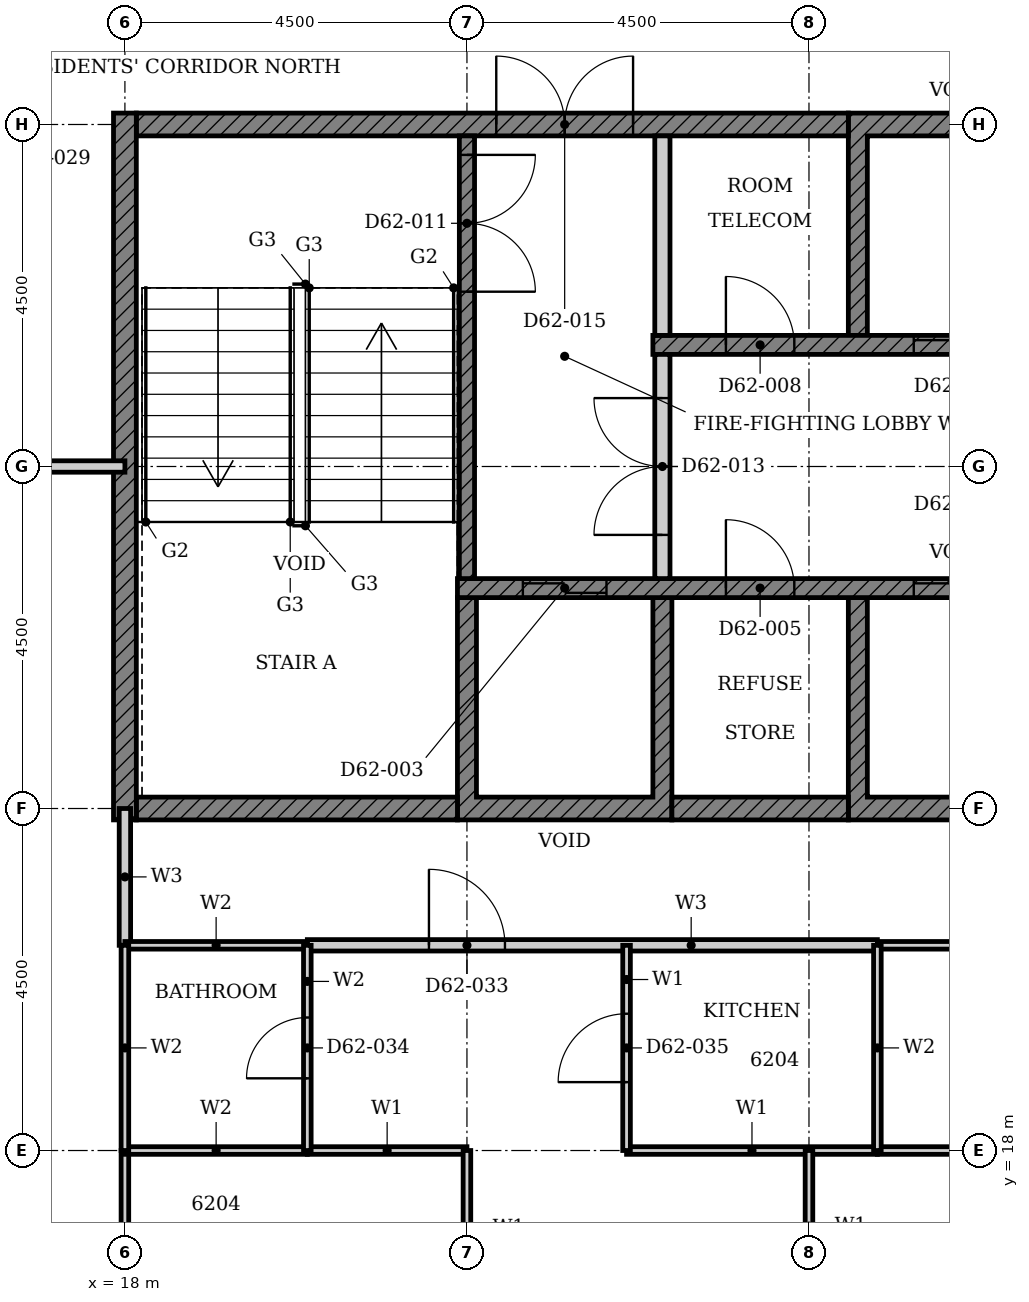
"""IFC4 building model, lengths in metres.
Left out: names, types, materials, properties, quantities, classifications, styles, units other than length and angle.
Written with IfcOpenShell. Run it as: python <this file> out.ifc"""

import sys

from ifc_helpers import new_model, si_unit, direction, frame, frame_2d, origin, place, context, subcontext, project, spatial, polyline, rectangle, outline, extrude, element, fill, save


model = new_model("IFC4")
c1 = context("Model", 3, precision=1e-05, world=origin(), true_north=direction((0.0, 1.0)))
c2 = subcontext(c1, "Body", "Model", "MODEL_VIEW")
j1 = project(units=[si_unit("LENGTHUNIT", "METRE"), si_unit("PLANEANGLEUNIT", "RADIAN")], contexts=[c1])
p1 = place(None, origin())
s1 = spatial("IfcSite", under=j1, at=p1, CompositionType="ELEMENT")
p2 = place(p1, origin())
s2 = spatial("IfcBuilding", under=s1, at=p2, CompositionType="ELEMENT")
p3 = place(p2, frame((0.0, 0.0, 245.3)))
s3 = spatial("IfcBuildingStorey", under=s2, at=p3, CompositionType="ELEMENT", Elevation=245.3)
p4 = place(p3, origin())
e1 = element("IfcWall", 1, at=p4, inside=s3, PredefinedType="SHEAR", context=c2, shape_type="SweptSolid", body=[
    extrude(outline(polyline([(22.375, 22.35), (25.197, 22.35), (25.197, 25.275), (24.947, 25.275), (24.947, 22.65), (22.625, 22.65), (22.625, 25.275), (22.375, 25.275), (22.375, 22.35)])), origin(), (0.0, 0.0, 1.0), 3.4),
])
p5 = place(p3, origin())
e2 = element("IfcWall", 2, at=p5, inside=s3, PredefinedType="SHEAR", context=c2, shape_type="SweptSolid", body=[
    extrude(outline(polyline([(27.518, 22.35), (30.339, 22.35), (30.339, 25.275), (30.089, 25.275), (30.089, 22.65), (27.768, 22.65), (27.768, 25.275), (27.518, 25.275), (27.518, 22.35)])), origin(), (0.0, 0.0, 1.0), 3.4),
])
p6 = place(p3, origin())
e3 = element("IfcWall", 3, at=p6, inside=s3, PredefinedType="SHEAR", context=c2, shape_type="SweptSolid", body=[
    extrude(outline(polyline([(27.518, 28.725), (27.768, 28.725), (27.768, 31.35), (30.089, 31.35), (30.089, 28.725), (30.339, 28.725), (30.339, 31.65), (27.518, 31.65), (27.518, 28.725)])), origin(), (0.0, 0.0, 1.0), 3.4),
])
p7 = place(p3, frame((18.15, 22.5, 0.0), z_axis=(0.0, 0.0, 1.0), x_axis=(1.0, 0.0, 0.0)))
e4 = element("IfcWall", 4, at=p7, inside=s3, PredefinedType="SHEAR", context=c2, shape_type="SweptSolid", body=[
    extrude(rectangle(XDim=4.225, YDim=0.3, at=frame_2d((2.113, 0.0))), origin(), (0.0, 0.0, 1.0), 3.4),
])
p8 = place(p3, frame((25.197, 22.5, 0.0), z_axis=(0.0, 0.0, 1.0), x_axis=(1.0, 0.0, 0.0)))
e5 = element("IfcWall", 5, at=p8, inside=s3, PredefinedType="SHEAR", context=c2, shape_type="SweptSolid", body=[
    extrude(rectangle(XDim=2.321, YDim=0.3, at=frame_2d((1.161, 0.0))), origin(), (0.0, 0.0, 1.0), 3.4),
])
p9 = place(p3, frame((18.15, 31.5, 0.0), z_axis=(0.0, 0.0, 1.0), x_axis=(1.0, 0.0, 0.0)))
e6 = element("IfcWall", 6, at=p9, inside=s3, PredefinedType="SHEAR", context=c2, shape_type="SweptSolid", body=[
    extrude(rectangle(XDim=9.368, YDim=0.3, at=frame_2d((4.684, 0.0))), origin(), (0.0, 0.0, 1.0), 3.4),
])
p10 = place(p9, frame((4.736, 0.0, 0.0)))
e7 = element("IfcOpeningElement", 7, at=p10, cuts=e6, PredefinedType="OPENING", context=c2, shape_type="SweptSolid", body=[
    extrude(rectangle(XDim=1.8, YDim=2.1, at=frame_2d((0.9, 1.05))), frame((0.0, 0.16, 0.0), z_axis=(0.0, -1.0, 0.0), x_axis=(1.0, 0.0, 0.0)), (0.0, 0.0, 1.0), 0.32),
])
p11 = place(p3, frame((18.0, 22.35, 0.0), z_axis=(0.0, 0.0, 1.0), x_axis=(0.0, 1.0, 0.0)))
e8 = element("IfcWall", 8, at=p11, inside=s3, PredefinedType="SHEAR", context=c2, shape_type="SweptSolid", body=[
    extrude(rectangle(XDim=9.3, YDim=0.3, at=frame_2d((4.65, 0.0))), origin(), (0.0, 0.0, 1.0), 3.4),
])
p12 = place(p3, frame((22.375, 25.4, 0.0), z_axis=(0.0, 0.0, 1.0), x_axis=(1.0, 0.0, 0.0)))
e9 = element("IfcWall", 9, at=p12, inside=s3, PredefinedType="SHEAR", context=c2, shape_type="SweptSolid", body=[
    extrude(rectangle(XDim=15.678, YDim=0.25, at=frame_2d((7.839, 0.0))), origin(), (0.0, 0.0, 1.0), 3.4),
])
p13 = place(p12, frame((6.004, 0.0, 0.0)))
e10 = element("IfcOpeningElement", 10, at=p13, cuts=e9, PredefinedType="OPENING", context=c2, shape_type="SweptSolid", body=[
    extrude(rectangle(XDim=1.1, YDim=2.1, at=frame_2d((0.55, 1.05))), frame((0.0, 0.135, 0.0), z_axis=(0.0, -1.0, 0.0), x_axis=(1.0, 0.0, 0.0)), (0.0, 0.0, 1.0), 0.27),
])
p14 = place(p12, frame((0.861, 0.0, 0.0)))
e11 = element("IfcOpeningElement", 11, at=p14, cuts=e9, PredefinedType="OPENING", context=c2, shape_type="SweptSolid", body=[
    extrude(rectangle(XDim=1.1, YDim=2.1, at=frame_2d((0.55, 1.05))), frame((0.0, 0.135, 0.0), z_axis=(0.0, -1.0, 0.0), x_axis=(1.0, 0.0, 0.0)), (0.0, 0.0, 1.0), 0.27),
])
p15 = place(p12, frame((3.532, 0.0, 0.0)))
e12 = element("IfcOpeningElement", 12, at=p15, cuts=e9, PredefinedType="OPENING", context=c2, shape_type="SweptSolid", body=[
    extrude(rectangle(XDim=0.9, YDim=2.1, at=frame_2d((0.45, 1.05))), frame((0.0, 0.135, 0.0), z_axis=(0.0, -1.0, 0.0), x_axis=(1.0, 0.0, 0.0)), (0.0, 0.0, 1.0), 0.27),
])
p16 = place(p12, frame((8.675, 0.0, 0.0)))
e13 = element("IfcOpeningElement", 13, at=p16, cuts=e9, PredefinedType="OPENING", context=c2, shape_type="SweptSolid", body=[
    extrude(rectangle(XDim=0.9, YDim=2.1, at=frame_2d((0.45, 1.05))), frame((0.0, 0.135, 0.0), z_axis=(0.0, -1.0, 0.0), x_axis=(1.0, 0.0, 0.0)), (0.0, 0.0, 1.0), 0.27),
])
p17 = place(p12, frame((12.532, 0.0, 0.0)))
e14 = element("IfcOpeningElement", 14, at=p17, cuts=e9, PredefinedType="OPENING", context=c2, shape_type="SweptSolid", body=[
    extrude(rectangle(XDim=0.9, YDim=2.1, at=frame_2d((0.45, 1.05))), frame((0.0, 0.135, 0.0), z_axis=(0.0, -1.0, 0.0), x_axis=(1.0, 0.0, 0.0)), (0.0, 0.0, 1.0), 0.27),
])
p18 = place(p3, frame((24.947, 28.6, 0.0), z_axis=(0.0, 0.0, 1.0), x_axis=(1.0, 0.0, 0.0)))
e15 = element("IfcWall", 15, at=p18, inside=s3, PredefinedType="SHEAR", context=c2, shape_type="SweptSolid", body=[
    extrude(rectangle(XDim=15.678, YDim=0.25, at=frame_2d((7.839, 0.0))), origin(), (0.0, 0.0, 1.0), 3.4),
])
p19 = place(p18, frame((3.432, 0.0, 0.0)))
e16 = element("IfcOpeningElement", 16, at=p19, cuts=e15, PredefinedType="OPENING", context=c2, shape_type="SweptSolid", body=[
    extrude(rectangle(XDim=1.1, YDim=2.1, at=frame_2d((0.55, 1.05))), frame((0.0, 0.135, 0.0), z_axis=(0.0, -1.0, 0.0), x_axis=(1.0, 0.0, 0.0)), (0.0, 0.0, 1.0), 0.27),
])
p20 = place(p18, frame((13.718, 0.0, 0.0)))
e17 = element("IfcOpeningElement", 17, at=p20, cuts=e15, PredefinedType="OPENING", context=c2, shape_type="SweptSolid", body=[
    extrude(rectangle(XDim=1.1, YDim=2.1, at=frame_2d((0.55, 1.05))), frame((0.0, 0.135, 0.0), z_axis=(0.0, -1.0, 0.0), x_axis=(1.0, 0.0, 0.0)), (0.0, 0.0, 1.0), 0.27),
])
p21 = place(p18, frame((0.961, 0.0, 0.0)))
e18 = element("IfcOpeningElement", 18, at=p21, cuts=e15, PredefinedType="OPENING", context=c2, shape_type="SweptSolid", body=[
    extrude(rectangle(XDim=0.9, YDim=2.1, at=frame_2d((0.45, 1.05))), frame((0.0, 0.135, 0.0), z_axis=(0.0, -1.0, 0.0), x_axis=(1.0, 0.0, 0.0)), (0.0, 0.0, 1.0), 0.27),
])
p22 = place(p18, frame((7.389, 0.0, 0.0)))
e19 = element("IfcOpeningElement", 19, at=p22, cuts=e15, PredefinedType="OPENING", context=c2, shape_type="SweptSolid", body=[
    extrude(rectangle(XDim=0.9, YDim=2.1, at=frame_2d((0.45, 1.05))), frame((0.0, 0.135, 0.0), z_axis=(0.0, -1.0, 0.0), x_axis=(1.0, 0.0, 0.0)), (0.0, 0.0, 1.0), 0.27),
])
p23 = place(p18, frame((11.246, 0.0, 0.0)))
e20 = element("IfcOpeningElement", 20, at=p23, cuts=e15, PredefinedType="OPENING", context=c2, shape_type="SweptSolid", body=[
    extrude(rectangle(XDim=0.9, YDim=2.1, at=frame_2d((0.45, 1.05))), frame((0.0, 0.135, 0.0), z_axis=(0.0, -1.0, 0.0), x_axis=(1.0, 0.0, 0.0)), (0.0, 0.0, 1.0), 0.27),
])
p24 = place(p3, frame((25.072, 28.725, 0.0), z_axis=(0.0, 0.0, 1.0), x_axis=(0.0, 1.0, 0.0)))
e21 = element("IfcWall", 21, at=p24, inside=s3, PredefinedType="PARTITIONING", context=c2, shape_type="SweptSolid", body=[
    extrude(rectangle(XDim=2.625, YDim=0.2, at=frame_2d((1.312, 0.0))), origin(), (0.0, 0.0, 1.0), 3.4),
])
p25 = place(p3, frame((22.5, 31.35, 0.0), z_axis=(0.0, 0.0, 1.0), x_axis=(0.0, -1.0, 0.0)))
e22 = element("IfcWall", 22, at=p25, inside=s3, PredefinedType="SHEAR", context=c2, shape_type="SweptSolid", body=[
    extrude(rectangle(XDim=5.825, YDim=0.2, at=frame_2d((2.913, 0.0))), origin(), (0.0, 0.0, 1.0), 3.4),
])
p26 = place(p25, frame((0.25, 0.0, 0.0)))
e23 = element("IfcOpeningElement", 23, at=p26, cuts=e22, PredefinedType="OPENING", context=c2, shape_type="SweptSolid", body=[
    extrude(rectangle(XDim=1.8, YDim=2.1, at=frame_2d((0.9, 1.05))), frame((0.0, 0.11, 0.0), z_axis=(0.0, -1.0, 0.0), x_axis=(1.0, 0.0, 0.0)), (0.0, 0.0, 1.0), 0.22),
])
p27 = place(p3, frame((25.072, 25.525, 0.0), z_axis=(0.0, 0.0, 1.0), x_axis=(0.0, 1.0, 0.0)))
e24 = element("IfcWall", 24, at=p27, inside=s3, PredefinedType="PARTITIONING", context=c2, shape_type="SweptSolid", body=[
    extrude(rectangle(XDim=2.95, YDim=0.2, at=frame_2d((1.475, 0.0))), origin(), (0.0, 0.0, 1.0), 3.4),
])
p28 = place(p27, frame((0.575, 0.0, 0.0)))
e25 = element("IfcOpeningElement", 25, at=p28, cuts=e24, PredefinedType="OPENING", context=c2, shape_type="SweptSolid", body=[
    extrude(rectangle(XDim=1.8, YDim=2.1, at=frame_2d((0.9, 1.05))), frame((0.0, 0.11, 0.0), z_axis=(0.0, -1.0, 0.0), x_axis=(1.0, 0.0, 0.0)), (0.0, 0.0, 1.0), 0.22),
])
p29 = place(p3, frame((20.4, 20.7, 0.0), z_axis=(0.0, 0.0, 1.0), x_axis=(1.0, 0.0, 0.0)))
e26 = element("IfcWall", 26, at=p29, inside=s3, PredefinedType="PARTITIONING", context=c2, shape_type="SweptSolid", body=[
    extrude(rectangle(XDim=7.5, YDim=0.15, at=frame_2d((3.75, 0.0))), origin(), (0.0, 0.0, 1.0), 3.4),
])
p30 = place(p29, frame((1.6, 0.0, 0.0)))
e27 = element("IfcOpeningElement", 27, at=p30, cuts=e26, PredefinedType="OPENING", context=c2, shape_type="SweptSolid", body=[
    extrude(rectangle(XDim=1.0, YDim=2.2, at=frame_2d((0.5, 1.1))), frame((0.0, 0.085, 0.0), z_axis=(0.0, -1.0, 0.0), x_axis=(1.0, 0.0, 0.0)), (0.0, 0.0, 1.0), 0.17),
])
p31 = place(p3, frame((4.5, 27.0, 0.0), z_axis=(0.0, 0.0, 1.0), x_axis=(1.0, 0.0, 0.0)))
e28 = element("IfcWall", 28, at=p31, inside=s3, PredefinedType="PARTITIONING", context=c2, shape_type="SweptSolid", body=[
    extrude(rectangle(XDim=13.5, YDim=0.15, at=frame_2d((6.75, 0.0))), origin(), (0.0, 0.0, 1.0), 2.68),
])
p32 = place(p31, frame((5.35, 0.0, 0.0)))
e29 = element("IfcOpeningElement", 29, at=p32, cuts=e28, PredefinedType="OPENING", context=c2, shape_type="SweptSolid", body=[
    extrude(rectangle(XDim=1.0, YDim=2.1, at=frame_2d((0.5, 1.05))), frame((0.0, 0.085, 0.0), z_axis=(0.0, -1.0, 0.0), x_axis=(1.0, 0.0, 0.0)), (0.0, 0.0, 1.0), 0.17),
])
p33 = place(p3, frame((18.0, 20.7, 0.0), z_axis=(0.0, 0.0, 1.0), x_axis=(0.0, 1.0, 0.0)))
e30 = element("IfcWall", 30, at=p33, inside=s3, PredefinedType="PARTITIONING", context=c2, shape_type="SweptSolid", body=[
    extrude(rectangle(XDim=1.8, YDim=0.15, at=frame_2d((0.9, 0.0))), origin(), (0.0, 0.0, 1.0), 3.4),
])
p34 = place(p3, frame((20.4, 18.0, 0.0), z_axis=(0.0, 0.0, 1.0), x_axis=(1.0, 0.0, 0.0)))
e31 = element("IfcWall", 31, at=p34, inside=s3, PredefinedType="PARTITIONING", context=c2, shape_type="SweptSolid", body=[
    extrude(rectangle(XDim=2.1, YDim=0.1, at=frame_2d((1.05, 0.0))), origin(), (0.0, 0.0, 1.0), 3.4),
])
p35 = place(p3, frame((24.6, 18.0, 0.0), z_axis=(0.0, 0.0, 1.0), x_axis=(1.0, 0.0, 0.0)))
e32 = element("IfcWall", 32, at=p35, inside=s3, PredefinedType="PARTITIONING", context=c2, shape_type="SweptSolid", body=[
    extrude(rectangle(XDim=3.3, YDim=0.1, at=frame_2d((1.65, 0.0))), origin(), (0.0, 0.0, 1.0), 3.4),
])
p36 = place(p3, frame((18.0, 15.56, 0.0), z_axis=(0.0, 0.0, 1.0), x_axis=(0.0, 1.0, 0.0)))
e33 = element("IfcWall", 33, at=p36, inside=s3, PredefinedType="PARTITIONING", context=c2, shape_type="SweptSolid", body=[
    extrude(rectangle(XDim=2.439, YDim=0.1, at=frame_2d((1.219, 0.0))), origin(), (0.0, 0.0, 1.0), 3.4),
])
p37 = place(p3, frame((22.5, 13.26, 0.0), z_axis=(0.0, 0.0, 1.0), x_axis=(0.0, 1.0, 0.0)))
e34 = element("IfcWall", 34, at=p37, inside=s3, PredefinedType="PARTITIONING", context=c2, shape_type="SweptSolid", body=[
    extrude(rectangle(XDim=4.74, YDim=0.1, at=frame_2d((2.37, 0.0))), origin(), (0.0, 0.0, 1.0), 3.4),
])
p38 = place(p37, frame((1.8, 0.0, 0.0)))
e35 = element("IfcOpeningElement", 35, at=p38, cuts=e34, PredefinedType="OPENING", context=c2, shape_type="SweptSolid", body=[
    extrude(rectangle(XDim=0.9, YDim=2.1, at=frame_2d((0.45, 1.05))), frame((0.0, 0.06, 0.0), z_axis=(0.0, -1.0, 0.0), x_axis=(1.0, 0.0, 0.0)), (0.0, 0.0, 1.0), 0.12),
])
p39 = place(p3, frame((24.6, 18.0, 0.0), z_axis=(0.0, 0.0, 1.0), x_axis=(0.0, 1.0, 0.0)))
e36 = element("IfcWall", 36, at=p39, inside=s3, PredefinedType="PARTITIONING", context=c2, shape_type="SweptSolid", body=[
    extrude(rectangle(XDim=2.7, YDim=0.1, at=frame_2d((1.35, 0.0))), origin(), (0.0, 0.0, 1.0), 3.4),
])
p40 = place(p39, frame((0.9, 0.0, 0.0)))
e37 = element("IfcOpeningElement", 37, at=p40, cuts=e36, PredefinedType="OPENING", context=c2, shape_type="SweptSolid", body=[
    extrude(rectangle(XDim=0.9, YDim=2.1, at=frame_2d((0.45, 1.05))), frame((0.0, 0.06, 0.0), z_axis=(0.0, -1.0, 0.0), x_axis=(1.0, 0.0, 0.0)), (0.0, 0.0, 1.0), 0.12),
])
p41 = place(p3, frame((27.0, 13.31, 0.0), z_axis=(0.0, 0.0, 1.0), x_axis=(0.0, 1.0, 0.0)))
e38 = element("IfcWall", 38, at=p41, inside=s3, PredefinedType="PARTITIONING", context=c2, shape_type="SweptSolid", body=[
    extrude(rectangle(XDim=4.69, YDim=0.1, at=frame_2d((2.345, 0.0))), origin(), (0.0, 0.0, 1.0), 3.4),
])
p42 = place(p41, frame((1.8, 0.0, 0.0)))
e39 = element("IfcOpeningElement", 39, at=p42, cuts=e38, PredefinedType="OPENING", context=c2, shape_type="SweptSolid", body=[
    extrude(rectangle(XDim=0.9, YDim=2.1, at=frame_2d((0.45, 1.05))), frame((0.0, 0.06, 0.0), z_axis=(0.0, -1.0, 0.0), x_axis=(1.0, 0.0, 0.0)), (0.0, 0.0, 1.0), 0.12),
])
p43 = place(p3, frame((18.0, 18.0, 0.0), z_axis=(0.0, 0.0, 1.0), x_axis=(1.0, 0.0, 0.0)))
e40 = element("IfcWall", 40, at=p43, inside=s3, PredefinedType="PARTITIONING", context=c2, shape_type="SweptSolid", body=[
    extrude(rectangle(XDim=2.4, YDim=0.1, at=frame_2d((1.2, 0.0))), origin(), (0.0, 0.0, 1.0), 3.4),
])
p44 = place(p3, frame((27.9, 18.0, 0.0), z_axis=(0.0, 0.0, 1.0), x_axis=(1.0, 0.0, 0.0)))
e41 = element("IfcWall", 41, at=p44, inside=s3, PredefinedType="PARTITIONING", context=c2, shape_type="SweptSolid", body=[
    extrude(rectangle(XDim=3.6, YDim=0.1, at=frame_2d((1.8, 0.0))), origin(), (0.0, 0.0, 1.0), 3.4),
])
p45 = place(p44, frame((1.4, 0.0, 0.0)))
e42 = element("IfcOpeningElement", 42, at=p45, cuts=e41, PredefinedType="OPENING", context=c2, shape_type="SweptSolid", body=[
    extrude(rectangle(XDim=0.8, YDim=2.1, at=frame_2d((0.4, 1.05))), frame((0.0, 0.06, 0.0), z_axis=(0.0, -1.0, 0.0), x_axis=(1.0, 0.0, 0.0)), (0.0, 0.0, 1.0), 0.12),
])
p46 = place(p3, frame((18.0, 20.7, 0.0), z_axis=(0.0, 0.0, 1.0), x_axis=(1.0, 0.0, 0.0)))
e43 = element("IfcWall", 43, at=p46, inside=s3, PredefinedType="PARTITIONING", context=c2, shape_type="SweptSolid", body=[
    extrude(rectangle(XDim=2.4, YDim=0.1, at=frame_2d((1.2, 0.0))), origin(), (0.0, 0.0, 1.0), 3.4),
])
p47 = place(p3, frame((27.9, 20.7, 0.0), z_axis=(0.0, 0.0, 1.0), x_axis=(1.0, 0.0, 0.0)))
e44 = element("IfcWall", 44, at=p47, inside=s3, PredefinedType="PARTITIONING", context=c2, shape_type="SweptSolid", body=[
    extrude(rectangle(XDim=3.6, YDim=0.1, at=frame_2d((1.8, 0.0))), origin(), (0.0, 0.0, 1.0), 3.4),
])
p48 = place(p3, frame((18.0, 18.0, 0.0), z_axis=(0.0, 0.0, 1.0), x_axis=(0.0, 1.0, 0.0)))
e45 = element("IfcWall", 45, at=p48, inside=s3, PredefinedType="PARTITIONING", context=c2, shape_type="SweptSolid", body=[
    extrude(rectangle(XDim=2.7, YDim=0.1, at=frame_2d((1.35, 0.0))), origin(), (0.0, 0.0, 1.0), 3.4),
])
p49 = place(p3, frame((20.4, 18.0, 0.0), z_axis=(0.0, 0.0, 1.0), x_axis=(0.0, 1.0, 0.0)))
e46 = element("IfcWall", 46, at=p49, inside=s3, PredefinedType="PARTITIONING", context=c2, shape_type="SweptSolid", body=[
    extrude(rectangle(XDim=2.7, YDim=0.1, at=frame_2d((1.35, 0.0))), origin(), (0.0, 0.0, 1.0), 3.4),
])
p50 = place(p49, frame((0.95, 0.0, 0.0)))
e47 = element("IfcOpeningElement", 47, at=p50, cuts=e46, PredefinedType="OPENING", context=c2, shape_type="SweptSolid", body=[
    extrude(rectangle(XDim=0.8, YDim=2.1, at=frame_2d((0.4, 1.05))), frame((0.0, 0.06, 0.0), z_axis=(0.0, -1.0, 0.0), x_axis=(1.0, 0.0, 0.0)), (0.0, 0.0, 1.0), 0.12),
])
p51 = place(p3, frame((27.9, 18.0, 0.0), z_axis=(0.0, 0.0, 1.0), x_axis=(0.0, 1.0, 0.0)))
e48 = element("IfcWall", 48, at=p51, inside=s3, PredefinedType="PARTITIONING", context=c2, shape_type="SweptSolid", body=[
    extrude(rectangle(XDim=2.7, YDim=0.1, at=frame_2d((1.35, 0.0))), origin(), (0.0, 0.0, 1.0), 3.4),
])
p52 = place(p13, origin())
e49 = element("IfcDoor", 49, at=p52, inside=s3, OperationType="DOUBLE_DOOR_SLIDING", PredefinedType="DOOR", context=c2, shape_type="SweptSolid", body=[
    extrude(rectangle(XDim=1.1, YDim=2.1, at=frame_2d((0.55, 1.05))), frame((0.0, 0.025, 0.0), z_axis=(0.0, -1.0, 0.0), x_axis=(1.0, 0.0, 0.0)), (0.0, 0.0, 1.0), 0.05),
])
fill(e10, e49)
p53 = place(p19, origin())
e50 = element("IfcDoor", 50, at=p53, inside=s3, OperationType="DOUBLE_DOOR_SLIDING", PredefinedType="DOOR", context=c2, shape_type="SweptSolid", body=[
    extrude(rectangle(XDim=1.1, YDim=2.1, at=frame_2d((0.55, 1.05))), frame((0.0, 0.025, 0.0), z_axis=(0.0, -1.0, 0.0), x_axis=(1.0, 0.0, 0.0)), (0.0, 0.0, 1.0), 0.05),
])
fill(e16, e50)
p54 = place(p14, origin())
e51 = element("IfcDoor", 51, at=p54, inside=s3, OperationType="DOUBLE_DOOR_SLIDING", PredefinedType="DOOR", context=c2, shape_type="SweptSolid", body=[
    extrude(rectangle(XDim=1.1, YDim=2.1, at=frame_2d((0.55, 1.05))), frame((0.0, 0.025, 0.0), z_axis=(0.0, -1.0, 0.0), x_axis=(1.0, 0.0, 0.0)), (0.0, 0.0, 1.0), 0.05),
])
fill(e11, e51)
p55 = place(p15, origin())
e52 = element("IfcDoor", 52, at=p55, inside=s3, OperationType="SINGLE_SWING_LEFT", PredefinedType="DOOR", context=c2, shape_type="SweptSolid", body=[
    extrude(rectangle(XDim=0.9, YDim=2.1, at=frame_2d((0.45, 1.05))), frame((0.0, 0.025, 0.0), z_axis=(0.0, -1.0, 0.0), x_axis=(1.0, 0.0, 0.0)), (0.0, 0.0, 1.0), 0.05),
])
fill(e12, e52)
p56 = place(p21, origin())
e53 = element("IfcDoor", 53, at=p56, inside=s3, OperationType="SINGLE_SWING_LEFT", PredefinedType="DOOR", context=c2, shape_type="SweptSolid", body=[
    extrude(rectangle(XDim=0.9, YDim=2.1, at=frame_2d((0.45, 1.05))), frame((0.0, 0.025, 0.0), z_axis=(0.0, -1.0, 0.0), x_axis=(1.0, 0.0, 0.0)), (0.0, 0.0, 1.0), 0.05),
])
fill(e18, e53)
p57 = place(p26, origin())
e54 = element("IfcDoor", 54, at=p57, inside=s3, OperationType="DOUBLE_DOOR_SINGLE_SWING", PredefinedType="DOOR", context=c2, shape_type="SweptSolid", body=[
    extrude(rectangle(XDim=1.8, YDim=2.1, at=frame_2d((0.9, 1.05))), frame((0.0, 0.025, 0.0), z_axis=(0.0, -1.0, 0.0), x_axis=(1.0, 0.0, 0.0)), (0.0, 0.0, 1.0), 0.05),
])
fill(e23, e54)
p58 = place(p28, origin())
e55 = element("IfcDoor", 55, at=p58, inside=s3, OperationType="DOUBLE_DOOR_SINGLE_SWING", PredefinedType="DOOR", context=c2, shape_type="SweptSolid", body=[
    extrude(rectangle(XDim=1.8, YDim=2.1, at=frame_2d((0.9, 1.05))), frame((0.0, 0.025, 0.0), z_axis=(0.0, -1.0, 0.0), x_axis=(1.0, 0.0, 0.0)), (0.0, 0.0, 1.0), 0.05),
])
fill(e25, e55)
p59 = place(p10, origin())
e56 = element("IfcDoor", 56, at=p59, inside=s3, OperationType="DOUBLE_DOOR_SINGLE_SWING", PredefinedType="DOOR", context=c2, shape_type="SweptSolid", body=[
    extrude(rectangle(XDim=1.8, YDim=2.1, at=frame_2d((0.9, 1.05))), frame((0.0, 0.025, 0.0), z_axis=(0.0, -1.0, 0.0), x_axis=(1.0, 0.0, 0.0)), (0.0, 0.0, 1.0), 0.05),
])
fill(e7, e56)
p60 = place(p30, origin())
e57 = element("IfcDoor", 57, at=p60, inside=s3, OperationType="SINGLE_SWING_RIGHT", PredefinedType="DOOR", context=c2, shape_type="SweptSolid", body=[
    extrude(rectangle(XDim=1.0, YDim=2.2, at=frame_2d((0.5, 1.1))), frame((0.0, 0.025, 0.0), z_axis=(0.0, -1.0, 0.0), x_axis=(1.0, 0.0, 0.0)), (0.0, 0.0, 1.0), 0.05),
])
fill(e27, e57)
p61 = place(p50, origin())
e58 = element("IfcDoor", 58, at=p61, inside=s3, OperationType="SINGLE_SWING_LEFT", PredefinedType="DOOR", context=c2, shape_type="SweptSolid", body=[
    extrude(rectangle(XDim=0.8, YDim=2.1, at=frame_2d((0.4, 1.05))), frame((0.0, 0.025, 0.0), z_axis=(0.0, -1.0, 0.0), x_axis=(1.0, 0.0, 0.0)), (0.0, 0.0, 1.0), 0.05),
])
fill(e47, e58)
p62 = place(p40, origin())
e59 = element("IfcDoor", 59, at=p62, inside=s3, OperationType="SINGLE_SWING_LEFT", PredefinedType="DOOR", context=c2, shape_type="SweptSolid", body=[
    extrude(rectangle(XDim=0.9, YDim=2.1, at=frame_2d((0.45, 1.05))), frame((0.0, 0.025, 0.0), z_axis=(0.0, -1.0, 0.0), x_axis=(1.0, 0.0, 0.0)), (0.0, 0.0, 1.0), 0.05),
])
fill(e37, e59)
save(model, sys.argv[1])
